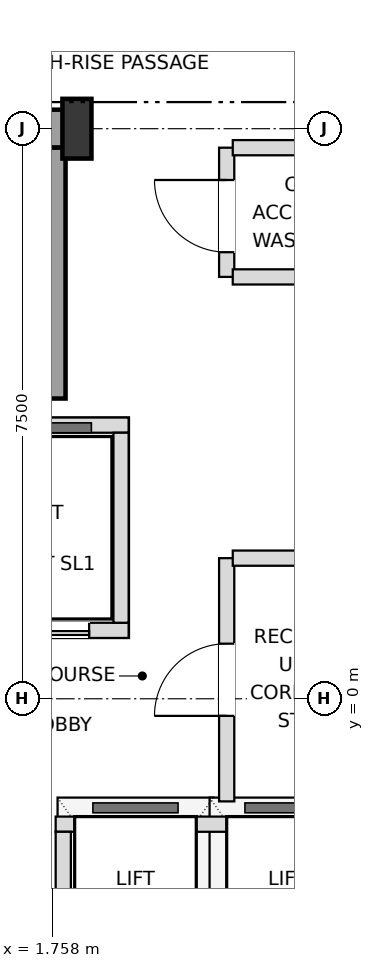
"""IFC4 building model, lengths in metres.
Left out: names, types, materials, properties, quantities, classifications, styles, units other than length and angle.
Written with IfcOpenShell. Run it as: python <this file> out.ifc"""

import sys

from ifc_helpers import new_model, si_unit, direction, frame, frame_2d, origin, origin_2d, place, context, subcontext, project, spatial, rectangle, i_section, extrude, element, fill, save


model = new_model("IFC4")
c1 = context("Model", 3, precision=1e-05, world=origin(), true_north=direction((0.0, 1.0)))
c2 = subcontext(c1, "Body", "Model", "MODEL_VIEW")
j1 = project(units=[si_unit("LENGTHUNIT", "METRE"), si_unit("PLANEANGLEUNIT", "RADIAN")], contexts=[c1])
p1 = place(None, origin())
s1 = spatial("IfcSite", under=j1, at=p1, CompositionType="ELEMENT")
p2 = place(p1, origin())
s2 = spatial("IfcBuilding", under=s1, at=p2, CompositionType="ELEMENT")
p3 = place(p2, frame((0.0, 0.0, 233.1)))
s3 = spatial("IfcBuildingStorey", under=s2, at=p3, CompositionType="ELEMENT", Elevation=233.1)
p4 = place(p3, frame((2.08, 7.5, 0.0), z_axis=(0.0, 0.0, 1.0), x_axis=(1.0, 0.0, 0.0)))
e1 = element("IfcColumn", 1, at=p4, inside=s3, PredefinedType="COLUMN", context=c2, shape_type="SweptSolid", body=[
    extrude(i_section(OverallWidth=0.382, OverallDepth=0.786, WebThickness=0.02, FlangeThickness=0.033, at=origin_2d()), origin(), (0.0, 0.0, 1.0), 3.6),
])
p5 = place(p3, frame((0.0, 7.5, 0.0), z_axis=(0.0, 0.0, 1.0), x_axis=(1.0, 0.0, 0.0)))
e2 = element("IfcWall", 2, at=p5, inside=s3, PredefinedType="SHEAR", context=c2, shape_type="SweptSolid", body=[
    extrude(rectangle(XDim=2.08, YDim=0.5, at=frame_2d((1.04, 0.0))), origin(), (0.0, 0.0, 1.0), 3.38),
])
p6 = place(p3, frame((1.73, 3.95, 0.0), z_axis=(0.0, 0.0, 1.0), x_axis=(0.0, 1.0, 0.0)))
e3 = element("IfcWall", 3, at=p6, inside=s3, PredefinedType="SHEAR", context=c2, shape_type="SweptSolid", body=[
    extrude(rectangle(XDim=3.3, YDim=0.4, at=frame_2d((1.65, 0.0))), origin(), (0.0, 0.0, 1.0), 3.38),
])
p7 = place(p3, frame((-2.82, 0.9, 0.0), z_axis=(0.0, 0.0, 1.0), x_axis=(1.0, 0.0, 0.0)))
e4 = element("IfcWall", 4, at=p7, inside=s3, PredefinedType="SOLIDWALL", context=c2, shape_type="SweptSolid", body=[
    extrude(rectangle(XDim=5.58, YDim=0.2, at=frame_2d((2.79, 0.0))), origin(), (0.0, 0.0, 1.0), 3.38),
])
p8 = place(p7, frame((0.49, 0.0, 0.0)))
e5 = element("IfcOpeningElement", 5, at=p8, cuts=e4, PredefinedType="OPENING", context=c2, shape_type="SweptSolid", body=[
    extrude(rectangle(XDim=1.1, YDim=2.15, at=frame_2d((0.55, 1.075))), frame((0.0, 0.11, 0.0), z_axis=(0.0, -1.0, 0.0), x_axis=(1.0, 0.0, 0.0)), (0.0, 0.0, 1.0), 0.22),
])
p9 = place(p7, frame((2.17, 0.0, 0.0)))
e6 = element("IfcOpeningElement", 6, at=p9, cuts=e4, PredefinedType="OPENING", context=c2, shape_type="SweptSolid", body=[
    extrude(rectangle(XDim=1.1, YDim=2.15, at=frame_2d((0.55, 1.075))), frame((0.0, 0.11, 0.0), z_axis=(0.0, -1.0, 0.0), x_axis=(1.0, 0.0, 0.0)), (0.0, 0.0, 1.0), 0.22),
])
p10 = place(p7, frame((3.86, 0.0, 0.0)))
e7 = element("IfcOpeningElement", 7, at=p10, cuts=e4, PredefinedType="OPENING", context=c2, shape_type="SweptSolid", body=[
    extrude(rectangle(XDim=1.2, YDim=2.2, at=frame_2d((0.6, 1.1))), frame((0.0, 0.11, 0.0), z_axis=(0.0, -1.0, 0.0), x_axis=(1.0, 0.0, 0.0)), (0.0, 0.0, 1.0), 0.22),
])
p11 = place(p3, frame((-2.82, 3.6, 0.0), z_axis=(0.0, 0.0, 1.0), x_axis=(1.0, 0.0, 0.0)))
e8 = element("IfcWall", 8, at=p11, inside=s3, PredefinedType="SOLIDWALL", context=c2, shape_type="SweptSolid", body=[
    extrude(rectangle(XDim=5.58, YDim=0.2, at=frame_2d((2.79, 0.0))), origin(), (0.0, 0.0, 1.0), 3.38),
])
p12 = place(p3, frame((2.66, 1.0, 0.0), z_axis=(0.0, 0.0, 1.0), x_axis=(0.0, 1.0, 0.0)))
e9 = element("IfcWall", 9, at=p12, inside=s3, PredefinedType="SOLIDWALL", context=c2, shape_type="SweptSolid", body=[
    extrude(rectangle(XDim=2.5, YDim=0.2, at=frame_2d((1.25, 0.0))), origin(), (0.0, 0.0, 1.0), 3.38),
])
p13 = place(p3, frame((1.8, -1.65, 0.0), z_axis=(0.0, 0.0, 1.0), x_axis=(1.0, 0.0, 0.0)))
e10 = element("IfcWall", 10, at=p13, inside=s3, PredefinedType="SOLIDWALL", context=c2, shape_type="SweptSolid", body=[
    extrude(rectangle(XDim=4.1, YDim=0.2, at=frame_2d((2.05, 0.0))), origin(), (0.0, 0.0, 1.0), 3.38),
])
p14 = place(p3, frame((1.9, -3.75, 0.0), z_axis=(0.0, 0.0, 1.0), x_axis=(0.0, 1.0, 0.0)))
e11 = element("IfcWall", 11, at=p14, inside=s3, PredefinedType="SOLIDWALL", context=c2, shape_type="SweptSolid", body=[
    extrude(rectangle(XDim=2.0, YDim=0.2, at=frame_2d((1.0, 0.0))), origin(), (0.0, 0.0, 1.0), 3.38),
])
p15 = place(p3, frame((4.05, -1.35, 0.0), z_axis=(0.0, 0.0, 1.0), x_axis=(0.0, 1.0, 0.0)))
e12 = element("IfcWall", 12, at=p15, inside=s3, PredefinedType="SOLIDWALL", context=c2, shape_type="SweptSolid", body=[
    extrude(rectangle(XDim=3.2, YDim=0.2, at=frame_2d((1.6, 0.0))), origin(), (0.0, 0.0, 1.0), 3.38),
])
p16 = place(p15, frame((1.125, 0.0, 0.0)))
e13 = element("IfcOpeningElement", 13, at=p16, cuts=e12, PredefinedType="OPENING", context=c2, shape_type="SweptSolid", body=[
    extrude(rectangle(XDim=0.95, YDim=2.15, at=frame_2d((0.475, 1.075))), frame((0.0, 0.11, 0.0), z_axis=(0.0, -1.0, 0.0), x_axis=(1.0, 0.0, 0.0)), (0.0, 0.0, 1.0), 0.22),
])
p17 = place(p3, frame((4.05, 5.55, 0.0), z_axis=(0.0, 0.0, 1.0), x_axis=(0.0, 1.0, 0.0)))
e14 = element("IfcWall", 14, at=p17, inside=s3, PredefinedType="SOLIDWALL", context=c2, shape_type="SweptSolid", body=[
    extrude(rectangle(XDim=1.7, YDim=0.2, at=frame_2d((0.85, 0.0))), origin(), (0.0, 0.0, 1.0), 3.38),
])
p18 = place(p17, frame((0.325, 0.0, 0.0)))
e15 = element("IfcOpeningElement", 15, at=p18, cuts=e14, PredefinedType="OPENING", context=c2, shape_type="SweptSolid", body=[
    extrude(rectangle(XDim=0.95, YDim=2.15, at=frame_2d((0.475, 1.075))), frame((0.0, 0.11, 0.0), z_axis=(0.0, -1.0, 0.0), x_axis=(1.0, 0.0, 0.0)), (0.0, 0.0, 1.0), 0.22),
])
p19 = place(p3, frame((4.13, 1.85, 0.0), z_axis=(0.0, 0.0, 1.0), x_axis=(1.0, 0.0, 0.0)))
e16 = element("IfcWall", 16, at=p19, inside=s3, PredefinedType="SOLIDWALL", context=c2, shape_type="SweptSolid", body=[
    extrude(rectangle(XDim=2.04, YDim=0.2, at=frame_2d((1.02, 0.0))), origin(), (0.0, 0.0, 1.0), 3.38),
])
for number, where, z_axis, x_axis in (
    (17, (4.13, 5.55, 0.0), (0.0, 0.0, 1.0), (1.0, 0.0, 0.0)),
    (18, (4.13, 7.25, 0.0), (0.0, 0.0, 1.0), (1.0, 0.0, 0.0)),
):
    element("IfcWall", number, at=place(p3, frame(where, z_axis=z_axis, x_axis=x_axis)), inside=s3, PredefinedType="SOLIDWALL", context=c2, shape_type="SweptSolid", body=[
        extrude(rectangle(XDim=2.07, YDim=0.2, at=frame_2d((1.035, 0.0))), origin(), (0.0, 0.0, 1.0), 3.38),
    ])
p20 = place(p10, origin())
e19 = element("IfcDoor", 19, at=p20, inside=s3, OperationType="DOUBLE_DOOR_SLIDING", PredefinedType="DOOR", context=c2, shape_type="SweptSolid", body=[
    extrude(rectangle(XDim=1.2, YDim=2.2, at=frame_2d((0.6, 1.1))), frame((0.0, 0.025, 0.0), z_axis=(0.0, -1.0, 0.0), x_axis=(1.0, 0.0, 0.0)), (0.0, 0.0, 1.0), 0.05),
])
fill(e7, e19)
p21 = place(p16, origin())
e20 = element("IfcDoor", 20, at=p21, inside=s3, OperationType="SINGLE_SWING_LEFT", PredefinedType="DOOR", context=c2, shape_type="SweptSolid", body=[
    extrude(rectangle(XDim=0.95, YDim=2.15, at=frame_2d((0.475, 1.075))), frame((0.0, 0.025, 0.0), z_axis=(0.0, -1.0, 0.0), x_axis=(1.0, 0.0, 0.0)), (0.0, 0.0, 1.0), 0.05),
])
fill(e13, e20)
p22 = place(p18, origin())
e21 = element("IfcDoor", 21, at=p22, inside=s3, OperationType="SINGLE_SWING_RIGHT", PredefinedType="DOOR", context=c2, shape_type="SweptSolid", body=[
    extrude(rectangle(XDim=0.95, YDim=2.15, at=frame_2d((0.475, 1.075))), frame((0.0, 0.025, 0.0), z_axis=(0.0, -1.0, 0.0), x_axis=(1.0, 0.0, 0.0)), (0.0, 0.0, 1.0), 0.05),
])
fill(e15, e21)
save(model, sys.argv[1])
